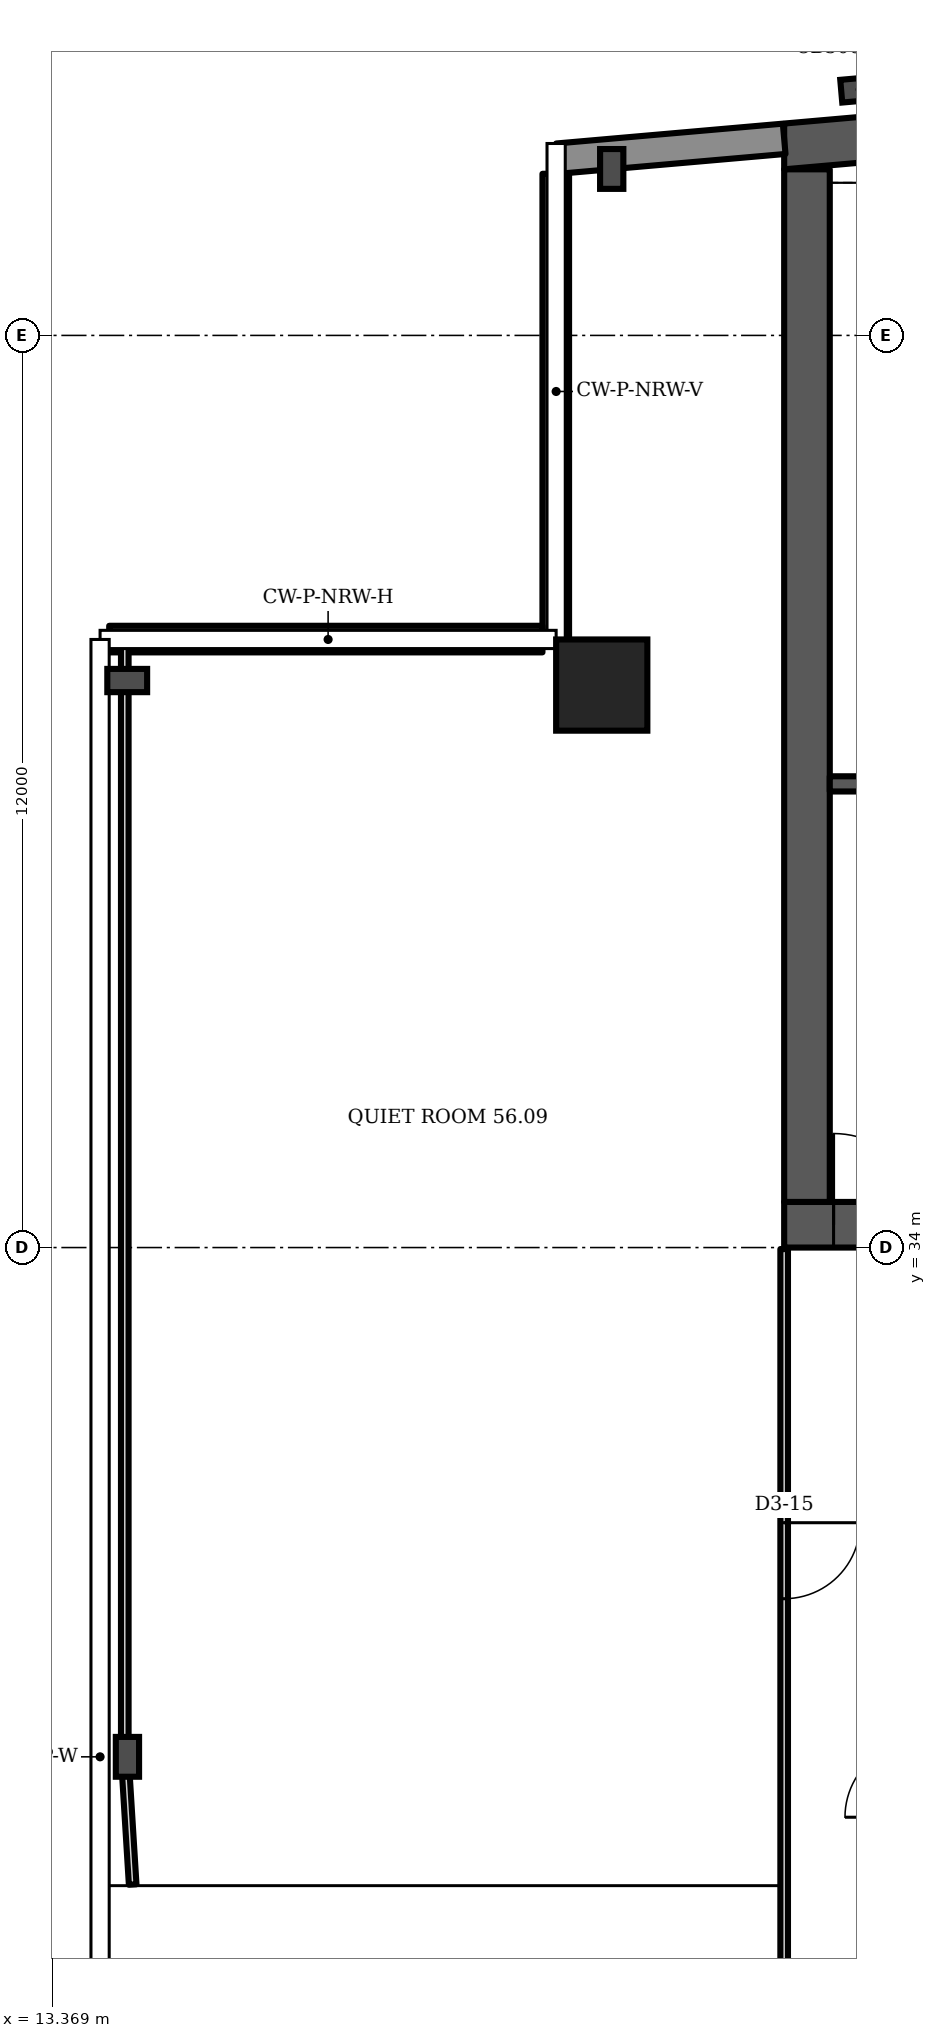
"""IFC4 building model, lengths in metres.
Left out: names, types, materials, properties, quantities, classifications, styles, units other than length and angle.
Written with IfcOpenShell. Run it as: python <this file> out.ifc"""

import sys

from ifc_helpers import new_model, si_unit, direction, frame, frame_2d, origin, origin_2d, place, context, subcontext, project, spatial, polyline, rectangle, i_section, outline, extrude, element, fill, save


model = new_model("IFC4")
c1 = context("Model", 3, precision=1e-05, world=origin(), true_north=direction((0.0, 1.0)))
c2 = subcontext(c1, "Body", "Model", "MODEL_VIEW")
j1 = project(units=[si_unit("LENGTHUNIT", "METRE"), si_unit("PLANEANGLEUNIT", "RADIAN")], contexts=[c1])
p1 = place(None, origin())
s1 = spatial("IfcSite", under=j1, at=p1, CompositionType="ELEMENT")
p2 = place(p1, origin())
s2 = spatial("IfcBuilding", under=s1, at=p2, CompositionType="ELEMENT")
p3 = place(p2, frame((0.0, 0.0, 225.1)))
s3 = spatial("IfcBuildingStorey", under=s2, at=p3, CompositionType="ELEMENT", Elevation=225.1)
p4 = place(p3, frame((0.0, 0.0, -0.0)))
e1 = element("IfcWall", 1, at=p4, inside=s3, PredefinedType="SHEAR", context=c2, shape_type="SweptSolid", body=[
    extrude(outline(polyline([(23.0, 48.185), (40.5, 49.716), (58.0, 48.185), (58.0, 48.787), (40.5, 50.318), (23.0, 48.787), (23.0, 48.185)])), origin(), (0.0, 0.0, 1.0), 3.6),
])
p5 = place(p3, frame((23.0, 34.3, 0.0), z_axis=(0.0, 0.0, 1.0), x_axis=(1.0, 0.0, 0.0)))
e2 = element("IfcWall", 2, at=p5, inside=s3, PredefinedType="SHEAR", context=c2, shape_type="SweptSolid", body=[
    extrude(rectangle(XDim=35.0, YDim=0.6, at=frame_2d((17.5, 0.0))), origin(), (0.0, 0.0, 1.0), 3.6),
])
p6 = place(p5, frame((0.65, 0.0, 0.0)))
e3 = element("IfcOpeningElement", 3, at=p6, cuts=e2, PredefinedType="OPENING", context=c2, shape_type="SweptSolid", body=[
    extrude(rectangle(XDim=1.2, YDim=2.1, at=frame_2d((0.6, 1.05))), frame((0.0, 0.31, 0.0), z_axis=(0.0, -1.0, 0.0), x_axis=(1.0, 0.0, 0.0)), (0.0, 0.0, 1.0), 0.62),
])
p7 = place(p5, frame((7.717, 0.0, 0.0)))
e4 = element("IfcOpeningElement", 4, at=p7, cuts=e2, PredefinedType="OPENING", context=c2, shape_type="SweptSolid", body=[
    extrude(rectangle(XDim=1.1, YDim=2.1, at=frame_2d((0.55, 1.05))), frame((0.0, 0.31, 0.0), z_axis=(0.0, -1.0, 0.0), x_axis=(1.0, 0.0, 0.0)), (0.0, 0.0, 1.0), 0.62),
])
p8 = place(p5, frame((12.183, 0.0, 0.0)))
e5 = element("IfcOpeningElement", 5, at=p8, cuts=e2, PredefinedType="OPENING", context=c2, shape_type="SweptSolid", body=[
    extrude(rectangle(XDim=1.1, YDim=2.1, at=frame_2d((0.55, 1.05))), frame((0.0, 0.31, 0.0), z_axis=(0.0, -1.0, 0.0), x_axis=(1.0, 0.0, 0.0)), (0.0, 0.0, 1.0), 0.62),
])
p9 = place(p5, frame((9.8, 0.0, 0.0)))
e6 = element("IfcOpeningElement", 6, at=p9, cuts=e2, PredefinedType="OPENING", context=c2, shape_type="SweptSolid", body=[
    extrude(rectangle(XDim=1.4, YDim=2.1, at=frame_2d((0.7, 1.05))), frame((0.0, 0.31, 0.0), z_axis=(0.0, -1.0, 0.0), x_axis=(1.0, 0.0, 0.0)), (0.0, 0.0, 1.0), 0.62),
])
p10 = place(p5, frame((14.717, 0.0, 0.0)))
e7 = element("IfcOpeningElement", 7, at=p10, cuts=e2, PredefinedType="OPENING", context=c2, shape_type="SweptSolid", body=[
    extrude(rectangle(XDim=1.1, YDim=2.1, at=frame_2d((0.55, 1.05))), frame((0.0, 0.31, 0.0), z_axis=(0.0, -1.0, 0.0), x_axis=(1.0, 0.0, 0.0)), (0.0, 0.0, 1.0), 0.62),
])
p11 = place(p5, frame((16.95, 0.0, 0.0)))
e8 = element("IfcOpeningElement", 8, at=p11, cuts=e2, PredefinedType="OPENING", context=c2, shape_type="SweptSolid", body=[
    extrude(rectangle(XDim=1.1, YDim=2.1, at=frame_2d((0.55, 1.05))), frame((0.0, 0.31, 0.0), z_axis=(0.0, -1.0, 0.0), x_axis=(1.0, 0.0, 0.0)), (0.0, 0.0, 1.0), 0.62),
])
p12 = place(p5, frame((19.183, 0.0, 0.0)))
e9 = element("IfcOpeningElement", 9, at=p12, cuts=e2, PredefinedType="OPENING", context=c2, shape_type="SweptSolid", body=[
    extrude(rectangle(XDim=1.1, YDim=2.1, at=frame_2d((0.55, 1.05))), frame((0.0, 0.31, 0.0), z_axis=(0.0, -1.0, 0.0), x_axis=(1.0, 0.0, 0.0)), (0.0, 0.0, 1.0), 0.62),
])
p13 = place(p5, frame((26.15, 0.0, 0.0)))
e10 = element("IfcOpeningElement", 10, at=p13, cuts=e2, PredefinedType="OPENING", context=c2, shape_type="SweptSolid", body=[
    extrude(rectangle(XDim=1.2, YDim=2.1, at=frame_2d((0.6, 1.05))), frame((0.0, 0.31, 0.0), z_axis=(0.0, -1.0, 0.0), x_axis=(1.0, 0.0, 0.0)), (0.0, 0.0, 1.0), 0.62),
])
p14 = place(p5, frame((30.8, 0.0, 0.0)))
e11 = element("IfcOpeningElement", 11, at=p14, cuts=e2, PredefinedType="OPENING", context=c2, shape_type="SweptSolid", body=[
    extrude(rectangle(XDim=1.4, YDim=2.1, at=frame_2d((0.7, 1.05))), frame((0.0, 0.31, 0.0), z_axis=(0.0, -1.0, 0.0), x_axis=(1.0, 0.0, 0.0)), (0.0, 0.0, 1.0), 0.62),
])
p15 = place(p3, frame((23.3, 34.6, 0.0), z_axis=(0.0, 0.0, 1.0), x_axis=(0.0, 1.0, 0.0)))
e12 = element("IfcWall", 12, at=p15, inside=s3, PredefinedType="SHEAR", context=c2, shape_type="SweptSolid", body=[
    extrude(rectangle(XDim=13.585, YDim=0.6, at=frame_2d((6.792, 0.0))), origin(), (0.0, 0.0, 1.0), 3.6),
])
p16 = place(p3, frame((20.6, 41.4, 0.0), z_axis=(0.0, 0.0, 1.0), x_axis=(1.0, 0.0, 0.0)))
e13 = element("IfcColumn", 13, at=p16, inside=s3, PredefinedType="COLUMN", context=c2, shape_type="SweptSolid", body=[
    extrude(rectangle(XDim=1.2, YDim=1.2, at=origin_2d()), origin(), (0.0, 0.0, 1.0), 3.6),
])
for number, where, z_axis, x_axis in (
    (14, (20.731, 48.19, 0.0), (0.0, 0.0, 1.0), (-1.0, 0.0, 0.0)),
    (15, (14.357, 41.46, 0.0), (0.0, 0.0, 1.0), (0.0, 1.0, 0.0)),
    (16, (14.36, 27.3, 0.0), (0.0, 0.0, 1.0), (-1.0, 0.0, 0.0)),
):
    element("IfcColumn", number, at=place(p3, frame(where, z_axis=z_axis, x_axis=x_axis)), inside=s3, PredefinedType="COLUMN", context=c2, shape_type="SweptSolid", body=[
        extrude(i_section(OverallWidth=0.306, OverallDepth=0.524, WebThickness=0.021, FlangeThickness=0.04, FilletRadius=0.027, at=origin_2d()), origin(), (0.0, 0.0, 1.0), 3.6),
    ])
p17 = place(p3, frame((24.0, 49.235, 0.0), z_axis=(0.0, 0.0, 1.0), x_axis=(-0.087156, 0.996197, 0.0)))
e17 = element("IfcColumn", 17, at=p17, inside=s3, PredefinedType="COLUMN", context=c2, shape_type="SweptSolid", body=[
    extrude(i_section(OverallWidth=0.3, OverallDepth=0.5, WebThickness=0.014, FlangeThickness=0.028, FilletRadius=0.027, at=origin_2d()), origin(), (0.0, 0.0, 1.0), 3.6),
])
p18 = place(p3, frame((23.0, 48.587, 0.0), z_axis=(0.0, 0.0, 1.0), x_axis=(-0.996194, -0.087168, 0.0)))
e18 = element("IfcWall", 18, at=p18, inside=s3, PredefinedType="SOLIDWALL", context=c2, shape_type="SweptSolid", body=[
    extrude(rectangle(XDim=2.994, YDim=0.4, at=frame_2d((1.497, 0.0))), origin(), (0.0, 0.0, 1.0), 3.2),
])
p19 = place(p3, frame((19.995, 48.126, 0.0), z_axis=(0.0, 0.0, 1.0), x_axis=(0.0, -1.0, 0.0)))
e19 = element("IfcWall", 19, at=p19, inside=s3, PredefinedType="SOLIDWALL", context=c2, shape_type="SweptSolid", body=[
    extrude(rectangle(XDim=6.126, YDim=0.35, at=frame_2d((3.063, 0.0))), origin(), (0.0, 0.0, 1.0), 1.0),
])
p20 = place(p3, frame((19.82, 42.005, 0.0), z_axis=(0.0, 0.0, 1.0), x_axis=(-1.0, 0.0, 0.0)))
e20 = element("IfcWall", 20, at=p20, inside=s3, PredefinedType="SOLIDWALL", context=c2, shape_type="SweptSolid", body=[
    extrude(rectangle(XDim=5.7, YDim=0.35, at=frame_2d((2.85, 0.0))), origin(), (0.0, 0.0, 1.0), 1.0),
])
p21 = place(p3, frame((23.6, 40.1, 0.0), z_axis=(0.0, 0.0, 1.0), x_axis=(1.0, 0.0, 0.0)))
e21 = element("IfcWall", 21, at=p21, inside=s3, PredefinedType="SHEAR", context=c2, shape_type="SweptSolid", body=[
    extrude(rectangle(XDim=6.1, YDim=0.2, at=frame_2d((3.05, 0.0))), origin(), (0.0, 0.0, 1.0), 3.2),
])
p22 = place(p21, frame((3.325, 0.0, 0.0)))
e22 = element("IfcOpeningElement", 22, at=p22, cuts=e21, PredefinedType="OPENING", context=c2, shape_type="SweptSolid", body=[
    extrude(rectangle(XDim=1.2, YDim=2.1, at=frame_2d((0.6, 1.05))), frame((0.0, 0.11, 0.0), z_axis=(0.0, -1.0, 0.0), x_axis=(1.0, 0.0, 0.0)), (0.0, 0.0, 1.0), 0.22),
])
p23 = place(p21, frame((0.475, 0.0, 0.0)))
e23 = element("IfcOpeningElement", 23, at=p23, cuts=e21, PredefinedType="OPENING", context=c2, shape_type="SweptSolid", body=[
    extrude(rectangle(XDim=0.9, YDim=2.1, at=frame_2d((0.45, 1.05))), frame((0.0, 0.11, 0.0), z_axis=(0.0, -1.0, 0.0), x_axis=(1.0, 0.0, 0.0)), (0.0, 0.0, 1.0), 0.22),
])
p24 = place(p3, frame((14.325, 27.3, 0.0), z_axis=(0.0, 0.0, 1.0), x_axis=(0.0, 1.0, 0.0)))
e24 = element("IfcWall", 24, at=p24, inside=s3, PredefinedType="PARTITIONING", context=c2, shape_type="SweptSolid", body=[
    extrude(rectangle(XDim=14.68, YDim=0.1, at=frame_2d((7.34, 0.0))), origin(), (0.0, 0.0, 1.0), 2.58),
])
p25 = place(p3, frame((14.429, 25.62, 0.0), z_axis=(0.0, 0.0, 1.0), x_axis=(-0.061647, 0.998101, 0.0)))
e25 = element("IfcWall", 25, at=p25, inside=s3, PredefinedType="PARTITIONING", context=c2, shape_type="SweptSolid", body=[
    extrude(rectangle(XDim=1.683, YDim=0.1, at=frame_2d((0.842, 0.0))), origin(), (0.0, 0.0, 1.0), 3.2),
])
p26 = place(p3, frame((23.0, 24.275, 0.0), z_axis=(0.0, 0.0, 1.0), x_axis=(0.0, 1.0, 0.0)))
e26 = element("IfcWall", 26, at=p26, inside=s3, PredefinedType="PARTITIONING", context=c2, shape_type="SweptSolid", body=[
    extrude(rectangle(XDim=9.705, YDim=0.1, at=frame_2d((4.853, 0.0))), origin(), (0.0, 0.0, 1.0), 3.2),
])
p27 = place(p26, frame((5.105, 0.0, 0.0)))
e27 = element("IfcOpeningElement", 27, at=p27, cuts=e26, PredefinedType="OPENING", context=c2, shape_type="SweptSolid", body=[
    extrude(rectangle(XDim=1.0, YDim=2.1, at=frame_2d((0.5, 1.05))), frame((0.0, 0.06, 0.0), z_axis=(0.0, -1.0, 0.0), x_axis=(1.0, 0.0, 0.0)), (0.0, 0.0, 1.0), 0.12),
])
p28 = place(p6, origin())
e28 = element("IfcDoor", 28, at=p28, inside=s3, OperationType="SINGLE_SWING_LEFT", PredefinedType="DOOR", context=c2, shape_type="SweptSolid", body=[
    extrude(rectangle(XDim=1.2, YDim=2.1, at=frame_2d((0.6, 1.05))), frame((0.0, 0.025, 0.0), z_axis=(0.0, -1.0, 0.0), x_axis=(1.0, 0.0, 0.0)), (0.0, 0.0, 1.0), 0.05),
])
fill(e3, e28)
p29 = place(p27, origin())
e29 = element("IfcDoor", 29, at=p29, inside=s3, OperationType="SINGLE_SWING_RIGHT", PredefinedType="DOOR", context=c2, shape_type="SweptSolid", body=[
    extrude(rectangle(XDim=1.0, YDim=2.1, at=frame_2d((0.5, 1.05))), frame((0.0, 0.025, 0.0), z_axis=(0.0, -1.0, 0.0), x_axis=(1.0, 0.0, 0.0)), (0.0, 0.0, 1.0), 0.05),
])
fill(e27, e29)
save(model, sys.argv[1])
